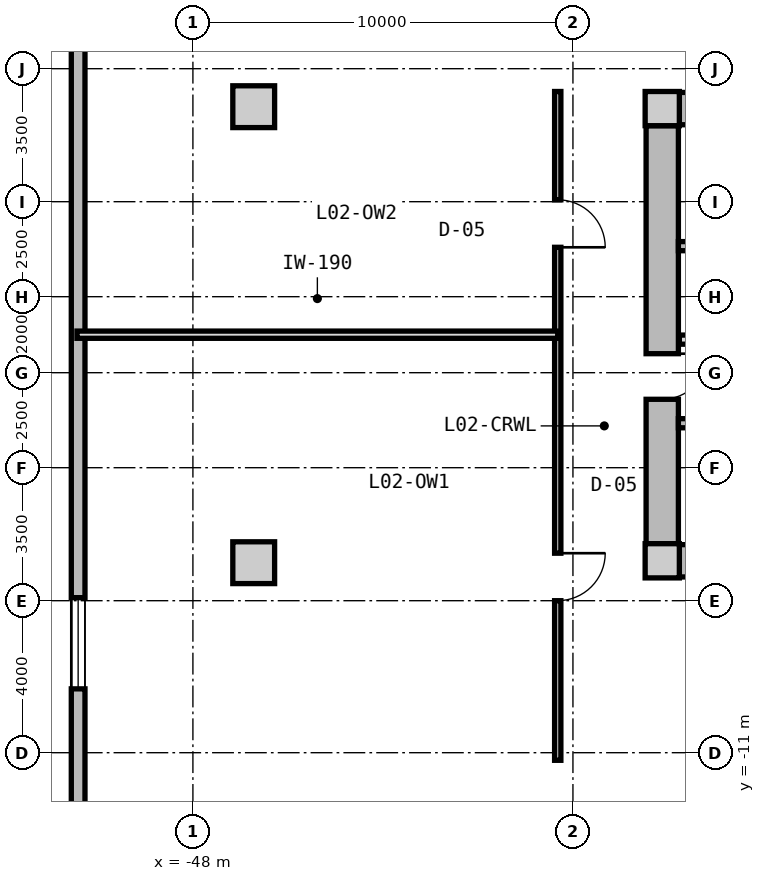
"""IFC4 building model, lengths in metres.
Left out: names, types, materials, properties, quantities, classifications, styles, units other than length and angle.
Written with IfcOpenShell. Run it as: python <this file> out.ifc"""

import sys

from ifc_helpers import new_model, si_unit, direction, frame, frame_2d, origin, origin_2d, place, context, subcontext, project, spatial, rectangle, extrude, source, transform, mapped, element, fill, save


model = new_model("IFC4")
c1 = context("Model", 3, precision=1e-05, world=origin(), true_north=direction((0.0, 1.0)))
c2 = subcontext(c1, "Body", "Model", "MODEL_VIEW")
j1 = project(units=[si_unit("LENGTHUNIT", "METRE"), si_unit("PLANEANGLEUNIT", "RADIAN")], contexts=[c1])
p1 = place(None, origin())
s1 = spatial("IfcSite", under=j1, at=p1, CompositionType="ELEMENT")
p2 = place(p1, origin())
s2 = spatial("IfcBuilding", under=s1, at=p2, CompositionType="ELEMENT")
p3 = place(p2, frame((0.0, 0.0, 8.4)))
s3 = spatial("IfcBuildingStorey", under=s2, at=p3, CompositionType="ELEMENT", Elevation=8.4)
m1 = source(origin(), c2, "Body", "SweptSolid", [
    extrude(rectangle(XDim=0.9, YDim=0.9, at=origin_2d()), origin(), (0.0, 0.0, 1.0), 4.2),
])
for number, where, z_axis, x_axis in (
    (1, (-35.65, -5.95, 0.0), (0.0, 0.0, 1.0), (1.0, 0.0, 0.0)),
    (2, (-35.65, 5.95, 0.0), (0.0, 0.0, 1.0), (1.0, 0.0, 0.0)),
):
    element("IfcColumn", number, at=place(p3, frame(where, z_axis=z_axis, x_axis=x_axis)), inside=s3, PredefinedType="COLUMN", context=c2, shape_type="MappedRepresentation", body=[
        mapped(m1, transform((0.0, 0.0, 0.0), x_axis=(1.0, 0.0, 0.0), y_axis=(0.0, 1.0, 0.0), z_axis=(0.0, 0.0, 1.0), scale=1.0)),
    ])
m2 = source(origin(), c2, "Body", "SweptSolid", [
    extrude(rectangle(XDim=14.4, YDim=0.85, at=frame_2d((7.2, 0.0))), origin(), (0.0, 0.0, 1.0), 3.88),
])
for number, where, z_axis, x_axis in (
    (3, (-35.2, 5.95, 0.0), (0.0, 0.0, 1.0), (1.0, 0.0, 0.0)),
    (4, (-20.8, -5.95, 0.0), (0.0, 0.0, 1.0), (-1.0, 0.0, 0.0)),
):
    element("IfcWall", number, at=place(p3, frame(where, z_axis=z_axis, x_axis=x_axis)), inside=s3, PredefinedType="SHEAR", context=c2, shape_type="MappedRepresentation", body=[
        mapped(m2, transform((0.0, 0.0, 0.0), x_axis=(1.0, 0.0, 0.0), y_axis=(0.0, 1.0, 0.0), z_axis=(0.0, 0.0, 1.0), scale=1.0)),
    ])
m3 = source(origin(), c2, "Body", "SweptSolid", [
    extrude(rectangle(XDim=11.0, YDim=0.85, at=frame_2d((5.5, 0.0))), origin(), (0.0, 0.0, 1.0), 3.88),
])
p4 = place(p3, frame((-35.65, -5.5, 0.0), z_axis=(0.0, 0.0, 1.0), x_axis=(0.0, 1.0, 0.0)))
e5 = element("IfcWall", 5, at=p4, inside=s3, PredefinedType="SHEAR", context=c2, shape_type="MappedRepresentation", body=[
    mapped(m3, transform((0.0, 0.0, 0.0), x_axis=(1.0, 0.0, 0.0), y_axis=(0.0, 1.0, 0.0), z_axis=(0.0, 0.0, 1.0), scale=1.0)),
])
p5 = place(p4, frame((3.8, 0.0, 0.0)))
e6 = element("IfcOpeningElement", 6, at=p5, cuts=e5, PredefinedType="OPENING", context=c2, shape_type="SweptSolid", body=[
    extrude(rectangle(XDim=1.2, YDim=2.15, at=frame_2d((0.6, 1.075))), frame((0.0, 0.435, 0.0), z_axis=(0.0, -1.0, 0.0), x_axis=(1.0, 0.0, 0.0)), (0.0, 0.0, 1.0), 0.87),
])
m4 = source(origin(), c2, "Body", "SweptSolid", [
    extrude(rectangle(XDim=1.1, YDim=1.1, at=origin_2d()), origin(), (0.0, 0.0, 1.0), 4.2),
])
for number, where, z_axis, x_axis in (
    (7, (-46.4, -6.0, 0.0), (0.0, 0.0, 1.0), (1.0, 0.0, 0.0)),
    (8, (-46.4, 6.0, 0.0), (0.0, 0.0, 1.0), (1.0, 0.0, 0.0)),
):
    element("IfcColumn", number, at=place(p3, frame(where, z_axis=z_axis, x_axis=x_axis)), inside=s3, PredefinedType="COLUMN", context=c2, shape_type="MappedRepresentation", body=[
        mapped(m4, transform((0.0, 0.0, 0.0), x_axis=(1.0, 0.0, 0.0), y_axis=(0.0, 1.0, 0.0), z_axis=(0.0, 0.0, 1.0), scale=1.0)),
    ])
m5 = source(origin(), c2, "Body", "SweptSolid", [
    extrude(rectangle(XDim=43.44, YDim=0.36, at=frame_2d((21.72, 0.0))), origin(), (0.0, 0.0, 1.0), 3.88),
])
p6 = place(p3, frame((-51.02, -21.72, 0.0), z_axis=(0.0, 0.0, 1.0), x_axis=(0.0, 1.0, 0.0)))
e9 = element("IfcWall", 9, at=p6, inside=s3, PredefinedType="SOLIDWALL", context=c2, shape_type="MappedRepresentation", body=[
    mapped(m5, transform((0.0, 0.0, 0.0), x_axis=(1.0, 0.0, 0.0), y_axis=(0.0, 1.0, 0.0), z_axis=(0.0, 0.0, 1.0), scale=1.0)),
])
p7 = place(p6, frame((4.0, 0.0, 0.9)))
e10 = element("IfcOpeningElement", 10, at=p7, cuts=e9, PredefinedType="OPENING", context=c2, shape_type="SweptSolid", body=[
    extrude(rectangle(XDim=1.8, YDim=2.0, at=frame_2d((0.9, 1.0))), frame((0.0, 0.19, 0.0), z_axis=(0.0, -1.0, 0.0), x_axis=(1.0, 0.0, 0.0)), (0.0, 0.0, 1.0), 0.38),
])
p8 = place(p6, frame((12.4, 0.0, 0.85)))
e11 = element("IfcOpeningElement", 11, at=p8, cuts=e9, PredefinedType="OPENING", context=c2, shape_type="SweptSolid", body=[
    extrude(rectangle(XDim=2.4, YDim=2.2, at=frame_2d((1.2, 1.1))), frame((0.0, 0.19, 0.0), z_axis=(0.0, -1.0, 0.0), x_axis=(1.0, 0.0, 0.0)), (0.0, 0.0, 1.0), 0.38),
])
m6 = source(origin(), c2, "Body", "SweptSolid", [
    extrude(rectangle(XDim=7.765, YDim=0.24, at=frame_2d((3.883, 0.0))), origin(), (0.0, 0.0, 1.0), 3.88),
])
p9 = place(p3, frame((-35.225, 2.33, 0.0), z_axis=(0.0, 0.0, 1.0), x_axis=(1.0, 0.0, 0.0)))
e12 = element("IfcWall", 12, at=p9, inside=s3, PredefinedType="PARTITIONING", context=c2, shape_type="MappedRepresentation", body=[
    mapped(m6, transform((0.0, 0.0, 0.0), x_axis=(1.0, 0.0, 0.0), y_axis=(0.0, 1.0, 0.0), z_axis=(0.0, 0.0, 1.0), scale=1.0)),
])
p10 = place(p3, frame((-35.225, -2.33, 0.0), z_axis=(0.0, 0.0, 1.0), x_axis=(1.0, 0.0, 0.0)))
e13 = element("IfcWall", 13, at=p10, inside=s3, PredefinedType="PARTITIONING", context=c2, shape_type="MappedRepresentation", body=[
    mapped(m6, transform((0.0, 0.0, 0.0), x_axis=(1.0, 0.0, 0.0), y_axis=(0.0, 1.0, 0.0), z_axis=(0.0, 0.0, 1.0), scale=1.0)),
])
p11 = place(p10, frame((0.885, 0.0, 0.0)))
e14 = element("IfcOpeningElement", 14, at=p11, cuts=e13, PredefinedType="OPENING", context=c2, shape_type="SweptSolid", body=[
    extrude(rectangle(XDim=1.1, YDim=2.15, at=frame_2d((0.55, 1.075))), frame((0.0, 0.13, 0.0), z_axis=(0.0, -1.0, 0.0), x_axis=(1.0, 0.0, 0.0)), (0.0, 0.0, 1.0), 0.26),
])
m7 = source(origin(), c2, "Body", "SweptSolid", [
    extrude(rectangle(XDim=7.62, YDim=0.24, at=frame_2d((3.81, 0.0))), origin(), (0.0, 0.0, 1.0), 3.865),
])
p12 = place(p3, frame((-35.2, -0.13, 0.0), z_axis=(0.0, 0.0, 1.0), x_axis=(1.0, 0.0, 0.0)))
e15 = element("IfcWall", 15, at=p12, inside=s3, PredefinedType="PARTITIONING", context=c2, shape_type="MappedRepresentation", body=[
    mapped(m7, transform((0.0, 0.0, 0.0), x_axis=(1.0, 0.0, 0.0), y_axis=(0.0, 1.0, 0.0), z_axis=(0.0, 0.0, 1.0), scale=1.0)),
])
p13 = place(p12, frame((6.22, 0.0, 0.0)))
e16 = element("IfcOpeningElement", 16, at=p13, cuts=e15, PredefinedType="OPENING", context=c2, shape_type="SweptSolid", body=[
    extrude(rectangle(XDim=1.0, YDim=2.1, at=frame_2d((0.5, 1.05))), frame((0.0, 0.13, 0.0), z_axis=(0.0, -1.0, 0.0), x_axis=(1.0, 0.0, 0.0)), (0.0, 0.0, 1.0), 0.26),
])
p14 = place(p12, frame((0.85, 0.0, 0.0)))
e17 = element("IfcOpeningElement", 17, at=p14, cuts=e15, PredefinedType="OPENING", context=c2, shape_type="SweptSolid", body=[
    extrude(rectangle(XDim=1.1, YDim=2.2, at=frame_2d((0.55, 1.1))), frame((0.0, 0.13, 0.0), z_axis=(0.0, -1.0, 0.0), x_axis=(1.0, 0.0, 0.0)), (0.0, 0.0, 1.0), 0.26),
])
p15 = place(p12, frame((3.85, 0.0, 0.0)))
e18 = element("IfcOpeningElement", 18, at=p15, cuts=e15, PredefinedType="OPENING", context=c2, shape_type="SweptSolid", body=[
    extrude(rectangle(XDim=1.1, YDim=2.2, at=frame_2d((0.55, 1.1))), frame((0.0, 0.13, 0.0), z_axis=(0.0, -1.0, 0.0), x_axis=(1.0, 0.0, 0.0)), (0.0, 0.0, 1.0), 0.26),
])
m8 = source(origin(), c2, "Body", "SweptSolid", [
    extrude(rectangle(XDim=17.6, YDim=0.165, at=frame_2d((8.8, 0.0))), origin(), (0.0, 0.0, 1.0), 3.865),
])
p16 = place(p3, frame((-38.4, -11.2, 0.0), z_axis=(0.0, 0.0, 1.0), x_axis=(0.0, 1.0, 0.0)))
e19 = element("IfcWall", 19, at=p16, inside=s3, PredefinedType="PARTITIONING", context=c2, shape_type="MappedRepresentation", body=[
    mapped(m8, transform((0.0, 0.0, 0.0), x_axis=(1.0, 0.0, 0.0), y_axis=(0.0, 1.0, 0.0), z_axis=(0.0, 0.0, 1.0), scale=1.0)),
])
p17 = place(p16, frame((4.2, 0.0, 0.0)))
e20 = element("IfcOpeningElement", 20, at=p17, cuts=e19, PredefinedType="OPENING", context=c2, shape_type="SweptSolid", body=[
    extrude(rectangle(XDim=1.25, YDim=2.2, at=frame_2d((0.625, 1.1))), frame((0.0, 0.093, 0.0), z_axis=(0.0, -1.0, 0.0), x_axis=(1.0, 0.0, 0.0)), (0.0, 0.0, 1.0), 0.185),
])
p18 = place(p16, frame((13.5, 0.0, 0.0)))
e21 = element("IfcOpeningElement", 21, at=p18, cuts=e19, PredefinedType="OPENING", context=c2, shape_type="SweptSolid", body=[
    extrude(rectangle(XDim=1.25, YDim=2.2, at=frame_2d((0.625, 1.1))), frame((0.0, 0.093, 0.0), z_axis=(0.0, -1.0, 0.0), x_axis=(1.0, 0.0, 0.0)), (0.0, 0.0, 1.0), 0.185),
])
m9 = source(origin(), c2, "Body", "SweptSolid", [
    extrude(rectangle(XDim=12.65, YDim=0.19, at=frame_2d((6.325, 0.0))), origin(), (0.0, 0.0, 1.0), 3.865),
])
p19 = place(p3, frame((-51.05, 0.0, 0.0), z_axis=(0.0, 0.0, 1.0), x_axis=(1.0, 0.0, 0.0)))
e22 = element("IfcWall", 22, at=p19, inside=s3, PredefinedType="PARTITIONING", context=c2, shape_type="MappedRepresentation", body=[
    mapped(m9, transform((0.0, 0.0, 0.0), x_axis=(1.0, 0.0, 0.0), y_axis=(0.0, 1.0, 0.0), z_axis=(0.0, 0.0, 1.0), scale=1.0)),
])
m10 = source(origin(), c2, "Body", "SweptSolid", [
    extrude(rectangle(XDim=2.4, YDim=2.2, at=frame_2d((1.2, 1.1))), frame((0.0, 0.03, 0.0), z_axis=(0.0, -1.0, 0.0), x_axis=(1.0, 0.0, 0.0)), (0.0, 0.0, 1.0), 0.06),
])
p20 = place(p8, origin())
e23 = element("IfcWindow", 23, at=p20, inside=s3, PartitioningType="SINGLE_PANEL", PredefinedType="WINDOW", context=c2, shape_type="MappedRepresentation", body=[
    mapped(m10, transform((0.0, 0.0, 0.0), x_axis=(1.0, 0.0, 0.0), y_axis=(0.0, 1.0, 0.0), z_axis=(0.0, 0.0, 1.0), scale=1.0)),
])
fill(e11, e23)
m11 = source(origin(), c2, "Body", "SweptSolid", [
    extrude(rectangle(XDim=1.2, YDim=2.15, at=frame_2d((0.6, 1.075))), frame((0.0, 0.025, 0.0), z_axis=(0.0, -1.0, 0.0), x_axis=(1.0, 0.0, 0.0)), (0.0, 0.0, 1.0), 0.05),
])
p21 = place(p5, frame((1.2, 0.0, 0.0), z_axis=(0.0, 0.0, 1.0), x_axis=(-1.0, 0.0, 0.0)))
e24 = element("IfcDoor", 24, at=p21, inside=s3, OperationType="SINGLE_SWING_LEFT", PredefinedType="DOOR", context=c2, shape_type="MappedRepresentation", body=[
    mapped(m11, transform((0.0, 0.0, 0.0), x_axis=(1.0, 0.0, 0.0), y_axis=(0.0, 1.0, 0.0), z_axis=(0.0, 0.0, 1.0), scale=1.0)),
])
fill(e6, e24)
m12 = source(origin(), c2, "Body", "SweptSolid", [
    extrude(rectangle(XDim=1.25, YDim=2.2, at=frame_2d((0.625, 1.1))), frame((0.0, 0.025, 0.0), z_axis=(0.0, -1.0, 0.0), x_axis=(1.0, 0.0, 0.0)), (0.0, 0.0, 1.0), 0.05),
])
p22 = place(p17, frame((1.25, 0.0, 0.0), z_axis=(0.0, 0.0, 1.0), x_axis=(-1.0, 0.0, 0.0)))
e25 = element("IfcDoor", 25, at=p22, inside=s3, OperationType="SINGLE_SWING_LEFT", PredefinedType="DOOR", context=c2, shape_type="MappedRepresentation", body=[
    mapped(m12, transform((0.0, 0.0, 0.0), x_axis=(1.0, 0.0, 0.0), y_axis=(0.0, 1.0, 0.0), z_axis=(0.0, 0.0, 1.0), scale=1.0)),
])
fill(e20, e25)
p23 = place(p18, frame((1.25, 0.0, 0.0), z_axis=(0.0, 0.0, 1.0), x_axis=(-1.0, 0.0, 0.0)))
e26 = element("IfcDoor", 26, at=p23, inside=s3, OperationType="SINGLE_SWING_RIGHT", PredefinedType="DOOR", context=c2, shape_type="MappedRepresentation", body=[
    mapped(m12, transform((0.0, 0.0, 0.0), x_axis=(1.0, 0.0, 0.0), y_axis=(0.0, 1.0, 0.0), z_axis=(0.0, 0.0, 1.0), scale=1.0)),
])
fill(e21, e26)
save(model, sys.argv[1])
